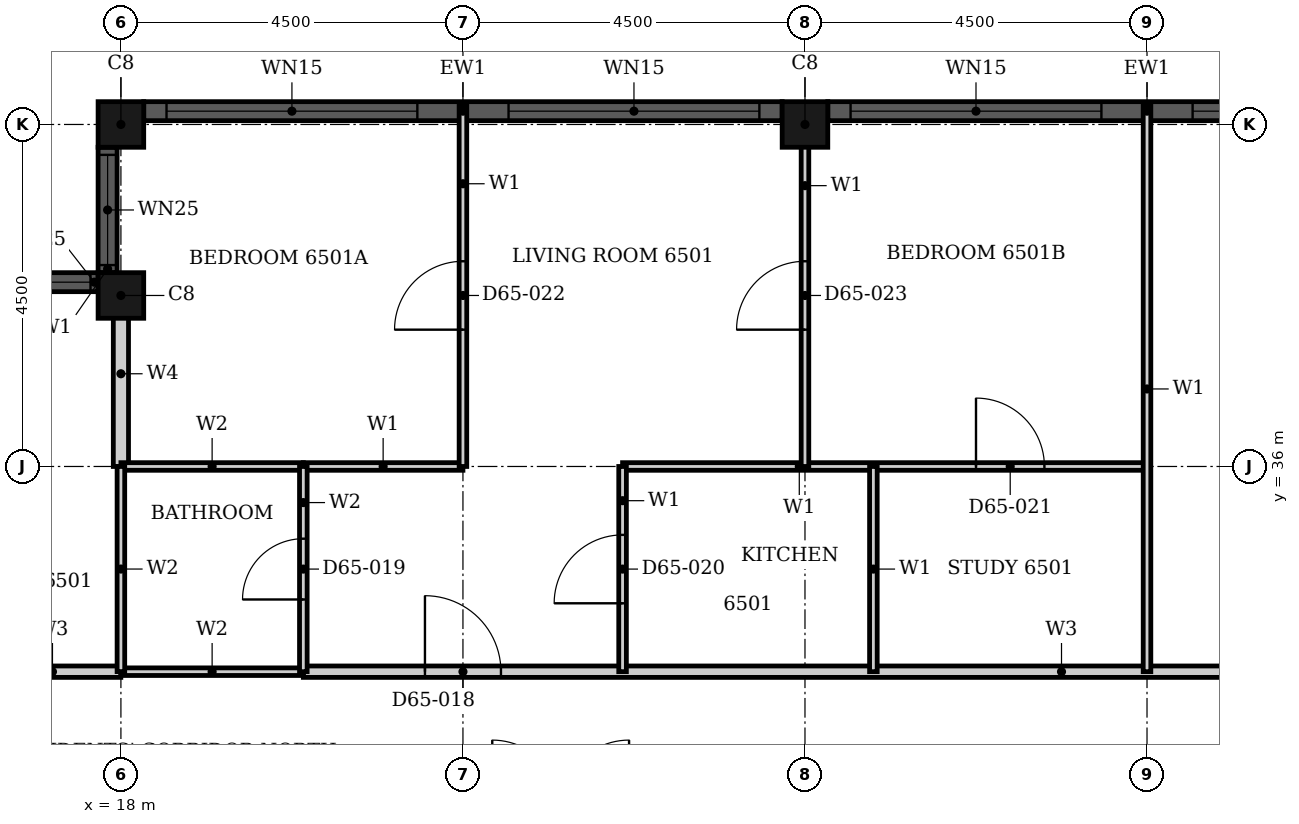
"""IFC4 building model, lengths in metres.
Left out: names, types, materials, properties, quantities, classifications, styles, units other than length and angle.
Written with IfcOpenShell. Run it as: python <this file> out.ifc"""

import sys

from ifc_helpers import new_model, si_unit, direction, frame, frame_2d, origin, origin_2d, place, context, subcontext, project, spatial, rectangle, hollow_rectangle, extrude, element, fill, save


model = new_model("IFC4")
c1 = context("Model", 3, precision=1e-05, world=origin(), true_north=direction((0.0, 1.0)))
c2 = subcontext(c1, "Body", "Model", "MODEL_VIEW")
j1 = project(units=[si_unit("LENGTHUNIT", "METRE"), si_unit("PLANEANGLEUNIT", "RADIAN")], contexts=[c1])
p1 = place(None, origin())
s1 = spatial("IfcSite", under=j1, at=p1, CompositionType="ELEMENT")
p2 = place(p1, origin())
s2 = spatial("IfcBuilding", under=s1, at=p2, CompositionType="ELEMENT")
p3 = place(p2, frame((0.0, 0.0, 256.4)))
s3 = spatial("IfcBuildingStorey", under=s2, at=p3, CompositionType="ELEMENT", Elevation=256.4)
for number, where, z_axis, x_axis in (
    (1, (27.0, 40.5, 0.0), (0.0, 0.0, 1.0), (1.0, 0.0, 0.0)),
    (2, (18.0, 40.5, 0.0), (0.0, 0.0, 1.0), (1.0, 0.0, 0.0)),
    (3, (18.0, 38.25, 0.0), (0.0, 0.0, 1.0), (1.0, 0.0, 0.0)),
):
    element("IfcColumn", number, at=place(p3, frame(where, z_axis=z_axis, x_axis=x_axis)), inside=s3, PredefinedType="COLUMN", context=c2, shape_type="SweptSolid", body=[
        extrude(hollow_rectangle(XDim=0.6, YDim=0.6, WallThickness=0.02, at=origin_2d()), origin(), (0.0, 0.0, 1.0), 3.7),
    ])
p4 = place(p3, frame((35.7, 40.675, 0.0), z_axis=(0.0, 0.0, 1.0), x_axis=(-1.0, 0.0, 0.0)))
e4 = element("IfcWall", 4, at=p4, inside=s3, PredefinedType="SOLIDWALL", context=c2, shape_type="SweptSolid", body=[
    extrude(rectangle(XDim=8.4, YDim=0.25, at=frame_2d((4.2, 0.0))), origin(), (0.0, 0.0, 1.0), 3.7),
])
p5 = place(p4, frame((0.3, 0.0, 0.45)))
e5 = element("IfcOpeningElement", 5, at=p5, cuts=e4, PredefinedType="OPENING", context=c2, shape_type="SweptSolid", body=[
    extrude(rectangle(XDim=3.3, YDim=2.3, at=frame_2d((1.65, 1.15))), frame((0.0, 0.135, 0.0), z_axis=(0.0, -1.0, 0.0), x_axis=(1.0, 0.0, 0.0)), (0.0, 0.0, 1.0), 0.27),
])
p6 = place(p4, frame((4.8, 0.0, 0.45)))
e6 = element("IfcOpeningElement", 6, at=p6, cuts=e4, PredefinedType="OPENING", context=c2, shape_type="SweptSolid", body=[
    extrude(rectangle(XDim=3.3, YDim=2.3, at=frame_2d((1.65, 1.15))), frame((0.0, 0.135, 0.0), z_axis=(0.0, -1.0, 0.0), x_axis=(1.0, 0.0, 0.0)), (0.0, 0.0, 1.0), 0.27),
])
p7 = place(p3, frame((26.7, 40.675, 0.0), z_axis=(0.0, 0.0, 1.0), x_axis=(-1.0, 0.0, 0.0)))
e7 = element("IfcWall", 7, at=p7, inside=s3, PredefinedType="SOLIDWALL", context=c2, shape_type="SweptSolid", body=[
    extrude(rectangle(XDim=8.4, YDim=0.25, at=frame_2d((4.2, 0.0))), origin(), (0.0, 0.0, 1.0), 3.7),
])
p8 = place(p7, frame((0.3, 0.0, 0.45)))
e8 = element("IfcOpeningElement", 8, at=p8, cuts=e7, PredefinedType="OPENING", context=c2, shape_type="SweptSolid", body=[
    extrude(rectangle(XDim=3.3, YDim=2.3, at=frame_2d((1.65, 1.15))), frame((0.0, 0.135, 0.0), z_axis=(0.0, -1.0, 0.0), x_axis=(1.0, 0.0, 0.0)), (0.0, 0.0, 1.0), 0.27),
])
p9 = place(p7, frame((4.8, 0.0, 0.45)))
e9 = element("IfcOpeningElement", 9, at=p9, cuts=e7, PredefinedType="OPENING", context=c2, shape_type="SweptSolid", body=[
    extrude(rectangle(XDim=3.3, YDim=2.3, at=frame_2d((1.65, 1.15))), frame((0.0, 0.135, 0.0), z_axis=(0.0, -1.0, 0.0), x_axis=(1.0, 0.0, 0.0)), (0.0, 0.0, 1.0), 0.27),
])
p10 = place(p3, frame((17.825, 40.2, 0.0), z_axis=(0.0, 0.0, 1.0), x_axis=(0.0, -1.0, 0.0)))
e10 = element("IfcWall", 10, at=p10, inside=s3, PredefinedType="SOLIDWALL", context=c2, shape_type="SweptSolid", body=[
    extrude(rectangle(XDim=1.65, YDim=0.25, at=frame_2d((0.825, 0.0))), origin(), (0.0, 0.0, 1.0), 3.7),
])
p11 = place(p10, frame((0.1, 0.0, 0.9)))
e11 = element("IfcOpeningElement", 11, at=p11, cuts=e10, PredefinedType="OPENING", context=c2, shape_type="SweptSolid", body=[
    extrude(rectangle(XDim=1.45, YDim=1.85, at=frame_2d((0.725, 0.925))), frame((0.0, 0.135, 0.0), z_axis=(0.0, -1.0, 0.0), x_axis=(1.0, 0.0, 0.0)), (0.0, 0.0, 1.0), 0.27),
])
p12 = place(p3, frame((17.7, 38.425, 0.0), z_axis=(0.0, 0.0, 1.0), x_axis=(-1.0, 0.0, 0.0)))
e12 = element("IfcWall", 12, at=p12, inside=s3, PredefinedType="SOLIDWALL", context=c2, shape_type="SweptSolid", body=[
    extrude(rectangle(XDim=1.65, YDim=0.25, at=frame_2d((0.825, 0.0))), origin(), (0.0, 0.0, 1.0), 3.7),
])
p13 = place(p12, frame((0.1, 0.0, 0.9)))
e13 = element("IfcOpeningElement", 13, at=p13, cuts=e12, PredefinedType="OPENING", context=c2, shape_type="SweptSolid", body=[
    extrude(rectangle(XDim=1.45, YDim=1.85, at=frame_2d((0.725, 0.925))), frame((0.0, 0.135, 0.0), z_axis=(0.0, -1.0, 0.0), x_axis=(1.0, 0.0, 0.0)), (0.0, 0.0, 1.0), 0.27),
])
p14 = place(p3, frame((20.4, 33.3, 0.0), z_axis=(0.0, 0.0, 1.0), x_axis=(1.0, 0.0, 0.0)))
e14 = element("IfcWall", 14, at=p14, inside=s3, PredefinedType="PARTITIONING", context=c2, shape_type="SweptSolid", body=[
    extrude(rectangle(XDim=24.6, YDim=0.15, at=frame_2d((12.3, 0.0))), origin(), (0.0, 0.0, 1.0), 3.4),
])
p15 = place(p14, frame((1.6, 0.0, 0.0)))
e15 = element("IfcOpeningElement", 15, at=p15, cuts=e14, PredefinedType="OPENING", context=c2, shape_type="SweptSolid", body=[
    extrude(rectangle(XDim=1.0, YDim=2.2, at=frame_2d((0.5, 1.1))), frame((0.0, 0.085, 0.0), z_axis=(0.0, -1.0, 0.0), x_axis=(1.0, 0.0, 0.0)), (0.0, 0.0, 1.0), 0.17),
])
p16 = place(p14, frame((17.35, 0.0, 0.0)))
e16 = element("IfcOpeningElement", 16, at=p16, cuts=e14, PredefinedType="OPENING", context=c2, shape_type="SweptSolid", body=[
    extrude(rectangle(XDim=1.0, YDim=2.1, at=frame_2d((0.5, 1.05))), frame((0.0, 0.085, 0.0), z_axis=(0.0, -1.0, 0.0), x_axis=(1.0, 0.0, 0.0)), (0.0, 0.0, 1.0), 0.17),
])
p17 = place(p3, frame((16.2, 33.3, 0.0), z_axis=(0.0, 0.0, 1.0), x_axis=(1.0, 0.0, 0.0)))
e17 = element("IfcWall", 17, at=p17, inside=s3, PredefinedType="PARTITIONING", context=c2, shape_type="SweptSolid", body=[
    extrude(rectangle(XDim=1.799, YDim=0.15, at=frame_2d((0.899, 0.0))), origin(), (0.0, 0.0, 1.0), 3.4),
])
p18 = place(p3, frame((20.4, 36.0, 0.0), z_axis=(0.0, 0.0, 1.0), x_axis=(1.0, 0.0, 0.0)))
e18 = element("IfcWall", 18, at=p18, inside=s3, PredefinedType="PARTITIONING", context=c2, shape_type="SweptSolid", body=[
    extrude(rectangle(XDim=2.1, YDim=0.1, at=frame_2d((1.05, 0.0))), origin(), (0.0, 0.0, 1.0), 3.4),
])
p19 = place(p3, frame((24.6, 36.0, 0.0), z_axis=(0.0, 0.0, 1.0), x_axis=(1.0, 0.0, 0.0)))
e19 = element("IfcWall", 19, at=p19, inside=s3, PredefinedType="PARTITIONING", context=c2, shape_type="SweptSolid", body=[
    extrude(rectangle(XDim=6.9, YDim=0.1, at=frame_2d((3.45, 0.0))), origin(), (0.0, 0.0, 1.0), 3.4),
])
p20 = place(p19, frame((4.65, 0.0, 0.0)))
e20 = element("IfcOpeningElement", 20, at=p20, cuts=e19, PredefinedType="OPENING", context=c2, shape_type="SweptSolid", body=[
    extrude(rectangle(XDim=0.9, YDim=2.1, at=frame_2d((0.45, 1.05))), frame((0.0, 0.06, 0.0), z_axis=(0.0, -1.0, 0.0), x_axis=(1.0, 0.0, 0.0)), (0.0, 0.0, 1.0), 0.12),
])
p21 = place(p3, frame((22.5, 36.0, 0.0), z_axis=(0.0, 0.0, 1.0), x_axis=(0.0, 1.0, 0.0)))
e21 = element("IfcWall", 21, at=p21, inside=s3, PredefinedType="PARTITIONING", context=c2, shape_type="SweptSolid", body=[
    extrude(rectangle(XDim=4.74, YDim=0.1, at=frame_2d((2.37, 0.0))), origin(), (0.0, 0.0, 1.0), 3.4),
])
p22 = place(p21, frame((1.8, 0.0, 0.0)))
e22 = element("IfcOpeningElement", 22, at=p22, cuts=e21, PredefinedType="OPENING", context=c2, shape_type="SweptSolid", body=[
    extrude(rectangle(XDim=0.9, YDim=2.1, at=frame_2d((0.45, 1.05))), frame((0.0, 0.06, 0.0), z_axis=(0.0, -1.0, 0.0), x_axis=(1.0, 0.0, 0.0)), (0.0, 0.0, 1.0), 0.12),
])
p23 = place(p3, frame((24.6, 33.3, 0.0), z_axis=(0.0, 0.0, 1.0), x_axis=(0.0, 1.0, 0.0)))
e23 = element("IfcWall", 23, at=p23, inside=s3, PredefinedType="PARTITIONING", context=c2, shape_type="SweptSolid", body=[
    extrude(rectangle(XDim=2.7, YDim=0.1, at=frame_2d((1.35, 0.0))), origin(), (0.0, 0.0, 1.0), 3.4),
])
p24 = place(p23, frame((0.9, 0.0, 0.0)))
e24 = element("IfcOpeningElement", 24, at=p24, cuts=e23, PredefinedType="OPENING", context=c2, shape_type="SweptSolid", body=[
    extrude(rectangle(XDim=0.9, YDim=2.1, at=frame_2d((0.45, 1.05))), frame((0.0, 0.06, 0.0), z_axis=(0.0, -1.0, 0.0), x_axis=(1.0, 0.0, 0.0)), (0.0, 0.0, 1.0), 0.12),
])
p25 = place(p3, frame((27.0, 36.0, 0.0), z_axis=(0.0, 0.0, 1.0), x_axis=(0.0, 1.0, 0.0)))
e25 = element("IfcWall", 25, at=p25, inside=s3, PredefinedType="PARTITIONING", context=c2, shape_type="SweptSolid", body=[
    extrude(rectangle(XDim=4.69, YDim=0.1, at=frame_2d((2.345, 0.0))), origin(), (0.0, 0.0, 1.0), 3.4),
])
p26 = place(p25, frame((1.8, 0.0, 0.0)))
e26 = element("IfcOpeningElement", 26, at=p26, cuts=e25, PredefinedType="OPENING", context=c2, shape_type="SweptSolid", body=[
    extrude(rectangle(XDim=0.9, YDim=2.1, at=frame_2d((0.45, 1.05))), frame((0.0, 0.06, 0.0), z_axis=(0.0, -1.0, 0.0), x_axis=(1.0, 0.0, 0.0)), (0.0, 0.0, 1.0), 0.12),
])
p27 = place(p3, frame((27.9, 33.3, 0.0), z_axis=(0.0, 0.0, 1.0), x_axis=(0.0, 1.0, 0.0)))
e27 = element("IfcWall", 27, at=p27, inside=s3, PredefinedType="PARTITIONING", context=c2, shape_type="SweptSolid", body=[
    extrude(rectangle(XDim=2.7, YDim=0.1, at=frame_2d((1.35, 0.0))), origin(), (0.0, 0.0, 1.0), 3.4),
])
p28 = place(p3, frame((31.5, 33.3, 0.0), z_axis=(0.0, 0.0, 1.0), x_axis=(0.0, 1.0, 0.0)))
e28 = element("IfcWall", 28, at=p28, inside=s3, PredefinedType="PARTITIONING", context=c2, shape_type="SweptSolid", body=[
    extrude(rectangle(XDim=7.44, YDim=0.1, at=frame_2d((3.72, 0.0))), origin(), (0.0, 0.0, 1.0), 3.4),
])
p29 = place(p3, frame((18.0, 36.0, 0.0), z_axis=(0.0, 0.0, 1.0), x_axis=(0.0, 1.0, 0.0)))
e29 = element("IfcWall", 29, at=p29, inside=s3, PredefinedType="PARTITIONING", context=c2, shape_type="SweptSolid", body=[
    extrude(rectangle(XDim=2.44, YDim=0.2, at=frame_2d((1.22, 0.0))), origin(), (0.0, 0.0, 1.0), 3.4),
])
for number, where, z_axis, x_axis in (
    (30, (18.0, 33.3, 0.0), (0.0, 0.0, 1.0), (1.0, 0.0, 0.0)),
    (31, (18.0, 36.0, 0.0), (0.0, 0.0, 1.0), (1.0, 0.0, 0.0)),
):
    element("IfcWall", number, at=place(p3, frame(where, z_axis=z_axis, x_axis=x_axis)), inside=s3, PredefinedType="PARTITIONING", context=c2, shape_type="SweptSolid", body=[
        extrude(rectangle(XDim=2.4, YDim=0.1, at=frame_2d((1.2, 0.0))), origin(), (0.0, 0.0, 1.0), 3.4),
    ])
p30 = place(p3, frame((18.0, 33.301, 0.0), z_axis=(0.0, 0.0, 1.0), x_axis=(0.0, 1.0, 0.0)))
e32 = element("IfcWall", 32, at=p30, inside=s3, PredefinedType="PARTITIONING", context=c2, shape_type="SweptSolid", body=[
    extrude(rectangle(XDim=2.699, YDim=0.1, at=frame_2d((1.35, 0.0))), origin(), (0.0, 0.0, 1.0), 3.4),
])
p31 = place(p3, frame((20.4, 33.3, 0.0), z_axis=(0.0, 0.0, 1.0), x_axis=(0.0, 1.0, 0.0)))
e33 = element("IfcWall", 33, at=p31, inside=s3, PredefinedType="PARTITIONING", context=c2, shape_type="SweptSolid", body=[
    extrude(rectangle(XDim=2.7, YDim=0.1, at=frame_2d((1.35, 0.0))), origin(), (0.0, 0.0, 1.0), 3.4),
])
p32 = place(p31, frame((0.95, 0.0, 0.0)))
e34 = element("IfcOpeningElement", 34, at=p32, cuts=e33, PredefinedType="OPENING", context=c2, shape_type="SweptSolid", body=[
    extrude(rectangle(XDim=0.8, YDim=2.1, at=frame_2d((0.4, 1.05))), frame((0.0, 0.06, 0.0), z_axis=(0.0, -1.0, 0.0), x_axis=(1.0, 0.0, 0.0)), (0.0, 0.0, 1.0), 0.12),
])
p33 = place(p5, origin())
e35 = element("IfcWindow", 35, at=p33, inside=s3, PartitioningType="SINGLE_PANEL", PredefinedType="WINDOW", context=c2, shape_type="SweptSolid", body=[
    extrude(rectangle(XDim=3.3, YDim=2.3, at=frame_2d((1.65, 1.15))), frame((0.0, 0.03, 0.0), z_axis=(0.0, -1.0, 0.0), x_axis=(1.0, 0.0, 0.0)), (0.0, 0.0, 1.0), 0.06),
])
fill(e5, e35)
p34 = place(p6, origin())
e36 = element("IfcWindow", 36, at=p34, inside=s3, PartitioningType="SINGLE_PANEL", PredefinedType="WINDOW", context=c2, shape_type="SweptSolid", body=[
    extrude(rectangle(XDim=3.3, YDim=2.3, at=frame_2d((1.65, 1.15))), frame((0.0, 0.03, 0.0), z_axis=(0.0, -1.0, 0.0), x_axis=(1.0, 0.0, 0.0)), (0.0, 0.0, 1.0), 0.06),
])
fill(e6, e36)
p35 = place(p8, origin())
e37 = element("IfcWindow", 37, at=p35, inside=s3, PartitioningType="SINGLE_PANEL", PredefinedType="WINDOW", context=c2, shape_type="SweptSolid", body=[
    extrude(rectangle(XDim=3.3, YDim=2.3, at=frame_2d((1.65, 1.15))), frame((0.0, 0.03, 0.0), z_axis=(0.0, -1.0, 0.0), x_axis=(1.0, 0.0, 0.0)), (0.0, 0.0, 1.0), 0.06),
])
fill(e8, e37)
p36 = place(p9, origin())
e38 = element("IfcWindow", 38, at=p36, inside=s3, PartitioningType="SINGLE_PANEL", PredefinedType="WINDOW", context=c2, shape_type="SweptSolid", body=[
    extrude(rectangle(XDim=3.3, YDim=2.3, at=frame_2d((1.65, 1.15))), frame((0.0, 0.03, 0.0), z_axis=(0.0, -1.0, 0.0), x_axis=(1.0, 0.0, 0.0)), (0.0, 0.0, 1.0), 0.06),
])
fill(e9, e38)
p37 = place(p11, origin())
e39 = element("IfcWindow", 39, at=p37, inside=s3, PartitioningType="SINGLE_PANEL", PredefinedType="WINDOW", context=c2, shape_type="SweptSolid", body=[
    extrude(rectangle(XDim=1.45, YDim=1.85, at=frame_2d((0.725, 0.925))), frame((0.0, 0.03, 0.0), z_axis=(0.0, -1.0, 0.0), x_axis=(1.0, 0.0, 0.0)), (0.0, 0.0, 1.0), 0.06),
])
fill(e11, e39)
p38 = place(p13, origin())
e40 = element("IfcWindow", 40, at=p38, inside=s3, PartitioningType="SINGLE_PANEL", PredefinedType="WINDOW", context=c2, shape_type="SweptSolid", body=[
    extrude(rectangle(XDim=1.45, YDim=1.85, at=frame_2d((0.725, 0.925))), frame((0.0, 0.03, 0.0), z_axis=(0.0, -1.0, 0.0), x_axis=(1.0, 0.0, 0.0)), (0.0, 0.0, 1.0), 0.06),
])
fill(e13, e40)
p39 = place(p15, origin())
e41 = element("IfcDoor", 41, at=p39, inside=s3, OperationType="SINGLE_SWING_RIGHT", PredefinedType="DOOR", context=c2, shape_type="SweptSolid", body=[
    extrude(rectangle(XDim=1.0, YDim=2.2, at=frame_2d((0.5, 1.1))), frame((0.0, 0.025, 0.0), z_axis=(0.0, -1.0, 0.0), x_axis=(1.0, 0.0, 0.0)), (0.0, 0.0, 1.0), 0.05),
])
fill(e15, e41)
p40 = place(p32, origin())
e42 = element("IfcDoor", 42, at=p40, inside=s3, OperationType="SINGLE_SWING_RIGHT", PredefinedType="DOOR", context=c2, shape_type="SweptSolid", body=[
    extrude(rectangle(XDim=0.8, YDim=2.1, at=frame_2d((0.4, 1.05))), frame((0.0, 0.025, 0.0), z_axis=(0.0, -1.0, 0.0), x_axis=(1.0, 0.0, 0.0)), (0.0, 0.0, 1.0), 0.05),
])
fill(e34, e42)
p41 = place(p24, origin())
e43 = element("IfcDoor", 43, at=p41, inside=s3, OperationType="SINGLE_SWING_LEFT", PredefinedType="DOOR", context=c2, shape_type="SweptSolid", body=[
    extrude(rectangle(XDim=0.9, YDim=2.1, at=frame_2d((0.45, 1.05))), frame((0.0, 0.025, 0.0), z_axis=(0.0, -1.0, 0.0), x_axis=(1.0, 0.0, 0.0)), (0.0, 0.0, 1.0), 0.05),
])
fill(e24, e43)
p42 = place(p20, origin())
e44 = element("IfcDoor", 44, at=p42, inside=s3, OperationType="SINGLE_SWING_RIGHT", PredefinedType="DOOR", context=c2, shape_type="SweptSolid", body=[
    extrude(rectangle(XDim=0.9, YDim=2.1, at=frame_2d((0.45, 1.05))), frame((0.0, 0.025, 0.0), z_axis=(0.0, -1.0, 0.0), x_axis=(1.0, 0.0, 0.0)), (0.0, 0.0, 1.0), 0.05),
])
fill(e20, e44)
p43 = place(p22, origin())
e45 = element("IfcDoor", 45, at=p43, inside=s3, OperationType="SINGLE_SWING_LEFT", PredefinedType="DOOR", context=c2, shape_type="SweptSolid", body=[
    extrude(rectangle(XDim=0.9, YDim=2.1, at=frame_2d((0.45, 1.05))), frame((0.0, 0.025, 0.0), z_axis=(0.0, -1.0, 0.0), x_axis=(1.0, 0.0, 0.0)), (0.0, 0.0, 1.0), 0.05),
])
fill(e22, e45)
p44 = place(p26, origin())
e46 = element("IfcDoor", 46, at=p44, inside=s3, OperationType="SINGLE_SWING_RIGHT", PredefinedType="DOOR", context=c2, shape_type="SweptSolid", body=[
    extrude(rectangle(XDim=0.9, YDim=2.1, at=frame_2d((0.45, 1.05))), frame((0.0, 0.025, 0.0), z_axis=(0.0, -1.0, 0.0), x_axis=(1.0, 0.0, 0.0)), (0.0, 0.0, 1.0), 0.05),
])
fill(e26, e46)
save(model, sys.argv[1])
